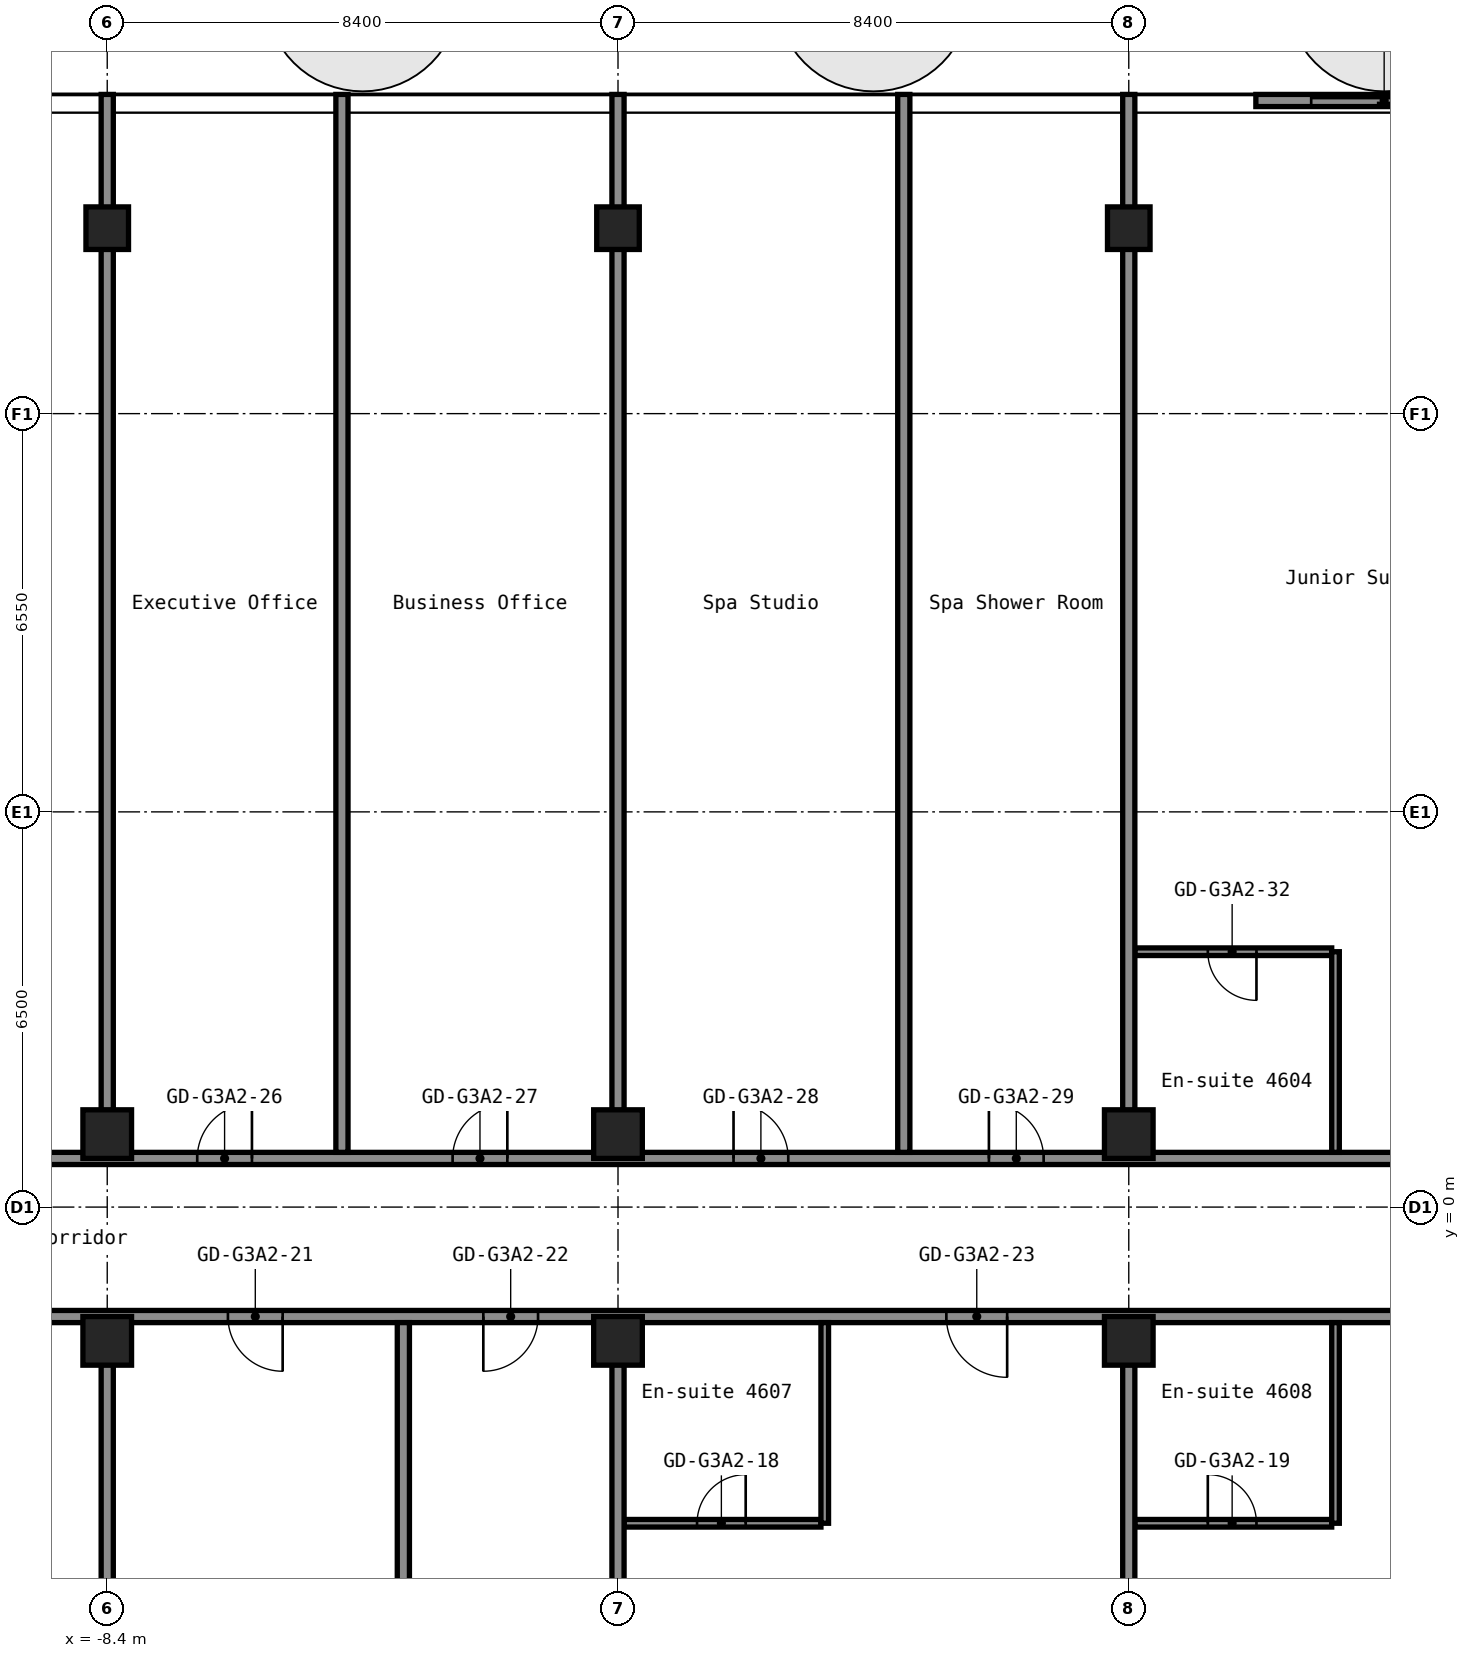
"""IFC4 building model, lengths in metres.
Left out: names, types, materials, properties, quantities, classifications, styles, units other than length and angle.
Written with IfcOpenShell. Run it as: python <this file> out.ifc"""

import sys

from ifc_helpers import new_model, si_unit, direction, frame, frame_2d, origin, origin_2d, place, context, subcontext, project, spatial, rectangle, hollow_rectangle, extrude, element, fill, save


model = new_model("IFC4")
c1 = context("Model", 3, precision=1e-05, world=origin(), true_north=direction((0.0, 1.0)))
c2 = subcontext(c1, "Body", "Model", "MODEL_VIEW")
j1 = project(units=[si_unit("LENGTHUNIT", "METRE"), si_unit("PLANEANGLEUNIT", "RADIAN")], contexts=[c1])
p1 = place(None, origin())
s1 = spatial("IfcSite", under=j1, at=p1, CompositionType="ELEMENT")
p2 = place(p1, origin())
s2 = spatial("IfcBuilding", under=s1, at=p2, CompositionType="ELEMENT")
p3 = place(p2, frame((0.0, 0.0, 163.0)))
s3 = spatial("IfcBuildingStorey", under=s2, at=p3, CompositionType="ELEMENT", Elevation=163.0)
for number, where, z_axis, x_axis in (
    (1, (-8.4, -2.2, 0.0), (0.0, 0.0, 1.0), (1.0, 0.0, 0.0)),
    (2, (-8.4, 1.2, 0.0), (0.0, 0.0, 1.0), (1.0, 0.0, 0.0)),
):
    element("IfcColumn", number, at=place(p3, frame(where, z_axis=z_axis, x_axis=x_axis)), inside=s3, PredefinedType="COLUMN", context=c2, shape_type="SweptSolid", body=[
        extrude(hollow_rectangle(XDim=0.8, YDim=0.8, WallThickness=0.032, at=origin_2d()), origin(), (0.0, 0.0, 1.0), 2.75),
    ])
p4 = place(p3, frame((-8.4, 16.1, 0.0), z_axis=(0.0, 0.0, 1.0), x_axis=(1.0, 0.0, 0.0)))
e3 = element("IfcColumn", 3, at=p4, inside=s3, PredefinedType="COLUMN", context=c2, shape_type="SweptSolid", body=[
    extrude(hollow_rectangle(XDim=0.7, YDim=0.7, WallThickness=0.028, at=origin_2d()), origin(), (0.0, 0.0, 1.0), 2.75),
])
for number, where, z_axis, x_axis in (
    (4, (0.0, -2.2, 0.0), (0.0, 0.0, 1.0), (1.0, 0.0, 0.0)),
    (5, (0.0, 1.2, 0.0), (0.0, 0.0, 1.0), (1.0, 0.0, 0.0)),
):
    element("IfcColumn", number, at=place(p3, frame(where, z_axis=z_axis, x_axis=x_axis)), inside=s3, PredefinedType="COLUMN", context=c2, shape_type="SweptSolid", body=[
        extrude(hollow_rectangle(XDim=0.8, YDim=0.8, WallThickness=0.032, at=origin_2d()), origin(), (0.0, 0.0, 1.0), 2.75),
    ])
p5 = place(p3, frame((0.0, 16.1, 0.0), z_axis=(0.0, 0.0, 1.0), x_axis=(1.0, 0.0, 0.0)))
e6 = element("IfcColumn", 6, at=p5, inside=s3, PredefinedType="COLUMN", context=c2, shape_type="SweptSolid", body=[
    extrude(hollow_rectangle(XDim=0.7, YDim=0.7, WallThickness=0.028, at=origin_2d()), origin(), (0.0, 0.0, 1.0), 2.75),
])
for number, where, z_axis, x_axis in (
    (7, (8.4, -2.2, 0.0), (0.0, 0.0, 1.0), (1.0, 0.0, 0.0)),
    (8, (8.4, 1.2, 0.0), (0.0, 0.0, 1.0), (1.0, 0.0, 0.0)),
):
    element("IfcColumn", number, at=place(p3, frame(where, z_axis=z_axis, x_axis=x_axis)), inside=s3, PredefinedType="COLUMN", context=c2, shape_type="SweptSolid", body=[
        extrude(hollow_rectangle(XDim=0.8, YDim=0.8, WallThickness=0.032, at=origin_2d()), origin(), (0.0, 0.0, 1.0), 2.75),
    ])
p6 = place(p3, frame((8.4, 16.1, 0.0), z_axis=(0.0, 0.0, 1.0), x_axis=(1.0, 0.0, 0.0)))
e9 = element("IfcColumn", 9, at=p6, inside=s3, PredefinedType="COLUMN", context=c2, shape_type="SweptSolid", body=[
    extrude(hollow_rectangle(XDim=0.7, YDim=0.7, WallThickness=0.028, at=origin_2d()), origin(), (0.0, 0.0, 1.0), 2.75),
])
p7 = place(p3, frame((0.1, -5.2, 0.0), z_axis=(0.0, 0.0, 1.0), x_axis=(1.0, 0.0, 0.0)))
e10 = element("IfcWall", 10, at=p7, inside=s3, PredefinedType="PARTITIONING", context=c2, shape_type="SweptSolid", body=[
    extrude(rectangle(XDim=3.237, YDim=0.125, at=frame_2d((1.619, 0.0))), origin(), (0.0, 0.0, 1.0), 2.75),
])
p8 = place(p7, frame((1.2, 0.0, 0.0)))
e11 = element("IfcOpeningElement", 11, at=p8, cuts=e10, PredefinedType="OPENING", context=c2, shape_type="SweptSolid", body=[
    extrude(rectangle(XDim=0.8, YDim=2.1, at=frame_2d((0.4, 1.05))), frame((0.0, 0.073, 0.0), z_axis=(0.0, -1.0, 0.0), x_axis=(1.0, 0.0, 0.0)), (0.0, 0.0, 1.0), 0.145),
])
p9 = place(p3, frame((8.5, -5.2, 0.0), z_axis=(0.0, 0.0, 1.0), x_axis=(1.0, 0.0, 0.0)))
e12 = element("IfcWall", 12, at=p9, inside=s3, PredefinedType="PARTITIONING", context=c2, shape_type="SweptSolid", body=[
    extrude(rectangle(XDim=3.238, YDim=0.125, at=frame_2d((1.619, 0.0))), origin(), (0.0, 0.0, 1.0), 2.75),
])
p10 = place(p9, frame((1.2, 0.0, 0.0)))
e13 = element("IfcOpeningElement", 13, at=p10, cuts=e12, PredefinedType="OPENING", context=c2, shape_type="SweptSolid", body=[
    extrude(rectangle(XDim=0.8, YDim=2.1, at=frame_2d((0.4, 1.05))), frame((0.0, 0.073, 0.0), z_axis=(0.0, -1.0, 0.0), x_axis=(1.0, 0.0, 0.0)), (0.0, 0.0, 1.0), 0.145),
])
p11 = place(p3, frame((-16.8, -1.8, 0.0), z_axis=(0.0, 0.0, 1.0), x_axis=(1.0, 0.0, 0.0)))
e14 = element("IfcWall", 14, at=p11, inside=s3, PredefinedType="PARTITIONING", context=c2, shape_type="SweptSolid", body=[
    extrude(rectangle(XDim=33.6, YDim=0.2, at=frame_2d((16.8, 0.0))), origin(), (0.0, 0.0, 1.0), 2.75),
])
p12 = place(p11, frame((5.4, 0.0, 0.0)))
e15 = element("IfcOpeningElement", 15, at=p12, cuts=e14, PredefinedType="OPENING", context=c2, shape_type="SweptSolid", body=[
    extrude(rectangle(XDim=1.0, YDim=2.1, at=frame_2d((0.5, 1.05))), frame((0.0, 0.11, 0.0), z_axis=(0.0, -1.0, 0.0), x_axis=(1.0, 0.0, 0.0)), (0.0, 0.0, 1.0), 0.22),
])
p13 = place(p11, frame((10.385, 0.0, 0.0)))
e16 = element("IfcOpeningElement", 16, at=p13, cuts=e14, PredefinedType="OPENING", context=c2, shape_type="SweptSolid", body=[
    extrude(rectangle(XDim=0.9, YDim=2.1, at=frame_2d((0.45, 1.05))), frame((0.0, 0.11, 0.0), z_axis=(0.0, -1.0, 0.0), x_axis=(1.0, 0.0, 0.0)), (0.0, 0.0, 1.0), 0.22),
])
p14 = place(p11, frame((14.585, 0.0, 0.0)))
e17 = element("IfcOpeningElement", 17, at=p14, cuts=e14, PredefinedType="OPENING", context=c2, shape_type="SweptSolid", body=[
    extrude(rectangle(XDim=0.9, YDim=2.1, at=frame_2d((0.45, 1.05))), frame((0.0, 0.11, 0.0), z_axis=(0.0, -1.0, 0.0), x_axis=(1.0, 0.0, 0.0)), (0.0, 0.0, 1.0), 0.22),
])
p15 = place(p11, frame((22.2, 0.0, 0.0)))
e18 = element("IfcOpeningElement", 18, at=p15, cuts=e14, PredefinedType="OPENING", context=c2, shape_type="SweptSolid", body=[
    extrude(rectangle(XDim=1.0, YDim=2.1, at=frame_2d((0.5, 1.05))), frame((0.0, 0.11, 0.0), z_axis=(0.0, -1.0, 0.0), x_axis=(1.0, 0.0, 0.0)), (0.0, 0.0, 1.0), 0.22),
])
p16 = place(p11, frame((30.6, 0.0, 0.0)))
e19 = element("IfcOpeningElement", 19, at=p16, cuts=e14, PredefinedType="OPENING", context=c2, shape_type="SweptSolid", body=[
    extrude(rectangle(XDim=1.0, YDim=2.1, at=frame_2d((0.5, 1.05))), frame((0.0, 0.11, 0.0), z_axis=(0.0, -1.0, 0.0), x_axis=(1.0, 0.0, 0.0)), (0.0, 0.0, 1.0), 0.22),
])
p17 = place(p3, frame((-16.8, 0.8, 0.0), z_axis=(0.0, 0.0, 1.0), x_axis=(1.0, 0.0, 0.0)))
e20 = element("IfcWall", 20, at=p17, inside=s3, PredefinedType="PARTITIONING", context=c2, shape_type="SweptSolid", body=[
    extrude(rectangle(XDim=33.6, YDim=0.2, at=frame_2d((16.8, 0.0))), origin(), (0.0, 0.0, 1.0), 2.75),
])
p18 = place(p17, frame((5.4, 0.0, 0.0)))
e21 = element("IfcOpeningElement", 21, at=p18, cuts=e20, PredefinedType="OPENING", context=c2, shape_type="SweptSolid", body=[
    extrude(rectangle(XDim=1.0, YDim=2.1, at=frame_2d((0.5, 1.05))), frame((0.0, 0.11, 0.0), z_axis=(0.0, -1.0, 0.0), x_axis=(1.0, 0.0, 0.0)), (0.0, 0.0, 1.0), 0.22),
])
p19 = place(p17, frame((9.88, 0.0, 0.0)))
e22 = element("IfcOpeningElement", 22, at=p19, cuts=e20, PredefinedType="OPENING", context=c2, shape_type="SweptSolid", body=[
    extrude(rectangle(XDim=0.9, YDim=2.1, at=frame_2d((0.45, 1.05))), frame((0.0, 0.11, 0.0), z_axis=(0.0, -1.0, 0.0), x_axis=(1.0, 0.0, 0.0)), (0.0, 0.0, 1.0), 0.22),
])
p20 = place(p17, frame((14.08, 0.0, 0.0)))
e23 = element("IfcOpeningElement", 23, at=p20, cuts=e20, PredefinedType="OPENING", context=c2, shape_type="SweptSolid", body=[
    extrude(rectangle(XDim=0.9, YDim=2.1, at=frame_2d((0.45, 1.05))), frame((0.0, 0.11, 0.0), z_axis=(0.0, -1.0, 0.0), x_axis=(1.0, 0.0, 0.0)), (0.0, 0.0, 1.0), 0.22),
])
p21 = place(p17, frame((18.7, 0.0, 0.0)))
e24 = element("IfcOpeningElement", 24, at=p21, cuts=e20, PredefinedType="OPENING", context=c2, shape_type="SweptSolid", body=[
    extrude(rectangle(XDim=0.9, YDim=2.1, at=frame_2d((0.45, 1.05))), frame((0.0, 0.11, 0.0), z_axis=(0.0, -1.0, 0.0), x_axis=(1.0, 0.0, 0.0)), (0.0, 0.0, 1.0), 0.22),
])
p22 = place(p17, frame((22.9, 0.0, 0.0)))
e25 = element("IfcOpeningElement", 25, at=p22, cuts=e20, PredefinedType="OPENING", context=c2, shape_type="SweptSolid", body=[
    extrude(rectangle(XDim=0.9, YDim=2.1, at=frame_2d((0.45, 1.05))), frame((0.0, 0.11, 0.0), z_axis=(0.0, -1.0, 0.0), x_axis=(1.0, 0.0, 0.0)), (0.0, 0.0, 1.0), 0.22),
])
p23 = place(p17, frame((30.6, 0.0, 0.0)))
e26 = element("IfcOpeningElement", 26, at=p23, cuts=e20, PredefinedType="OPENING", context=c2, shape_type="SweptSolid", body=[
    extrude(rectangle(XDim=1.0, YDim=2.1, at=frame_2d((0.5, 1.05))), frame((0.0, 0.11, 0.0), z_axis=(0.0, -1.0, 0.0), x_axis=(1.0, 0.0, 0.0)), (0.0, 0.0, 1.0), 0.22),
])
p24 = place(p3, frame((8.5, 4.2, 0.0), z_axis=(0.0, 0.0, 1.0), x_axis=(1.0, 0.0, 0.0)))
e27 = element("IfcWall", 27, at=p24, inside=s3, PredefinedType="PARTITIONING", context=c2, shape_type="SweptSolid", body=[
    extrude(rectangle(XDim=3.238, YDim=0.125, at=frame_2d((1.619, 0.0))), origin(), (0.0, 0.0, 1.0), 2.75),
])
p25 = place(p24, frame((1.2, 0.0, 0.0)))
e28 = element("IfcOpeningElement", 28, at=p25, cuts=e27, PredefinedType="OPENING", context=c2, shape_type="SweptSolid", body=[
    extrude(rectangle(XDim=0.8, YDim=2.1, at=frame_2d((0.4, 1.05))), frame((0.0, 0.073, 0.0), z_axis=(0.0, -1.0, 0.0), x_axis=(1.0, 0.0, 0.0)), (0.0, 0.0, 1.0), 0.145),
])
for number, where, z_axis, x_axis in (
    (29, (-8.4, -19.3, 0.0), (0.0, 0.0, 1.0), (0.0, 1.0, 0.0)),
    (30, (-8.4, 1.59, 0.0), (0.0, 0.0, 1.0), (0.0, 1.0, 0.0)),
):
    element("IfcWall", number, at=place(p3, frame(where, z_axis=z_axis, x_axis=x_axis)), inside=s3, PredefinedType="PARTITIONING", context=c2, shape_type="SweptSolid", body=[
        extrude(rectangle(XDim=16.71, YDim=0.2, at=frame_2d((8.355, 0.0))), origin(), (0.0, 0.0, 1.0), 2.75),
    ])
for number, where, z_axis, x_axis in (
    (31, (-4.54, 0.9, 0.0), (0.0, 0.0, 1.0), (0.0, 1.0, 0.0)),
    (32, (-3.53, -19.3, 0.0), (0.0, 0.0, 1.0), (0.0, 1.0, 0.0)),
):
    element("IfcWall", number, at=place(p3, frame(where, z_axis=z_axis, x_axis=x_axis)), inside=s3, PredefinedType="PARTITIONING", context=c2, shape_type="SweptSolid", body=[
        extrude(rectangle(XDim=17.4, YDim=0.2, at=frame_2d((8.7, 0.0))), origin(), (0.0, 0.0, 1.0), 2.75),
    ])
for number, where, z_axis, x_axis in (
    (33, (0.0, -19.3, 0.0), (0.0, 0.0, 1.0), (0.0, 1.0, 0.0)),
    (34, (0.0, 1.59, 0.0), (0.0, 0.0, 1.0), (0.0, 1.0, 0.0)),
):
    element("IfcWall", number, at=place(p3, frame(where, z_axis=z_axis, x_axis=x_axis)), inside=s3, PredefinedType="PARTITIONING", context=c2, shape_type="SweptSolid", body=[
        extrude(rectangle(XDim=16.71, YDim=0.2, at=frame_2d((8.355, 0.0))), origin(), (0.0, 0.0, 1.0), 2.75),
    ])
p26 = place(p3, frame((3.4, -5.2, 0.0), z_axis=(0.0, 0.0, 1.0), x_axis=(0.0, 1.0, 0.0)))
e35 = element("IfcWall", 35, at=p26, inside=s3, PredefinedType="PARTITIONING", context=c2, shape_type="SweptSolid", body=[
    extrude(rectangle(XDim=3.3, YDim=0.125, at=frame_2d((1.65, 0.0))), origin(), (0.0, 0.0, 1.0), 2.75),
])
p27 = place(p3, frame((4.7, 0.9, 0.0), z_axis=(0.0, 0.0, 1.0), x_axis=(0.0, 1.0, 0.0)))
e36 = element("IfcWall", 36, at=p27, inside=s3, PredefinedType="PARTITIONING", context=c2, shape_type="SweptSolid", body=[
    extrude(rectangle(XDim=17.4, YDim=0.2, at=frame_2d((8.7, 0.0))), origin(), (0.0, 0.0, 1.0), 2.75),
])
for number, where, z_axis, x_axis in (
    (37, (8.4, -19.3, 0.0), (0.0, 0.0, 1.0), (0.0, 1.0, 0.0)),
    (38, (8.4, 1.59, 0.0), (0.0, 0.0, 1.0), (0.0, 1.0, 0.0)),
):
    element("IfcWall", number, at=place(p3, frame(where, z_axis=z_axis, x_axis=x_axis)), inside=s3, PredefinedType="PARTITIONING", context=c2, shape_type="SweptSolid", body=[
        extrude(rectangle(XDim=16.71, YDim=0.2, at=frame_2d((8.355, 0.0))), origin(), (0.0, 0.0, 1.0), 2.75),
    ])
for number, where, z_axis, x_axis in (
    (39, (11.8, -5.2, 0.0), (0.0, 0.0, 1.0), (0.0, 1.0, 0.0)),
    (40, (11.8, 0.9, 0.0), (0.0, 0.0, 1.0), (0.0, 1.0, 0.0)),
):
    element("IfcWall", number, at=place(p3, frame(where, z_axis=z_axis, x_axis=x_axis)), inside=s3, PredefinedType="PARTITIONING", context=c2, shape_type="SweptSolid", body=[
        extrude(rectangle(XDim=3.3, YDim=0.125, at=frame_2d((1.65, 0.0))), origin(), (0.0, 0.0, 1.0), 2.75),
    ])
p28 = place(p3, frame((14.71, 18.2, 0.0), z_axis=(0.0, 0.0, 1.0), x_axis=(-1.0, 0.0, 0.0)))
p29 = place(p28, frame((0.91, 0.0, 0.0)))
p30 = place(p29, frame((2.4, 0.0, 0.0), z_axis=(0.0, 0.0, 1.0), x_axis=(-1.0, 0.0, 0.0)))
e41 = element("IfcDoor", 41, at=p30, inside=s3, OperationType="SLIDING_TO_LEFT", PredefinedType="DOOR", context=c2, shape_type="SweptSolid", body=[
    extrude(rectangle(XDim=2.4, YDim=2.2, at=frame_2d((1.2, 1.1))), frame((0.0, 0.025, 0.0), z_axis=(0.0, -1.0, 0.0), x_axis=(1.0, 0.0, 0.0)), (0.0, 0.0, 1.0), 0.05),
])
p31 = place(p8, origin())
e42 = element("IfcDoor", 42, at=p31, inside=s3, OperationType="SINGLE_SWING_LEFT", PredefinedType="DOOR", context=c2, shape_type="SweptSolid", body=[
    extrude(rectangle(XDim=0.8, YDim=2.1, at=frame_2d((0.4, 1.05))), frame((0.0, 0.025, 0.0), z_axis=(0.0, -1.0, 0.0), x_axis=(1.0, 0.0, 0.0)), (0.0, 0.0, 1.0), 0.05),
])
fill(e11, e42)
p32 = place(p10, origin())
e43 = element("IfcDoor", 43, at=p32, inside=s3, OperationType="SINGLE_SWING_RIGHT", PredefinedType="DOOR", context=c2, shape_type="SweptSolid", body=[
    extrude(rectangle(XDim=0.8, YDim=2.1, at=frame_2d((0.4, 1.05))), frame((0.0, 0.025, 0.0), z_axis=(0.0, -1.0, 0.0), x_axis=(1.0, 0.0, 0.0)), (0.0, 0.0, 1.0), 0.05),
])
fill(e13, e43)
p33 = place(p13, origin())
e44 = element("IfcDoor", 44, at=p33, inside=s3, OperationType="SINGLE_SWING_RIGHT", PredefinedType="DOOR", context=c2, shape_type="SweptSolid", body=[
    extrude(rectangle(XDim=0.9, YDim=2.1, at=frame_2d((0.45, 1.05))), frame((0.0, 0.025, 0.0), z_axis=(0.0, -1.0, 0.0), x_axis=(1.0, 0.0, 0.0)), (0.0, 0.0, 1.0), 0.05),
])
fill(e16, e44)
p34 = place(p14, origin())
e45 = element("IfcDoor", 45, at=p34, inside=s3, OperationType="SINGLE_SWING_LEFT", PredefinedType="DOOR", context=c2, shape_type="SweptSolid", body=[
    extrude(rectangle(XDim=0.9, YDim=2.1, at=frame_2d((0.45, 1.05))), frame((0.0, 0.025, 0.0), z_axis=(0.0, -1.0, 0.0), x_axis=(1.0, 0.0, 0.0)), (0.0, 0.0, 1.0), 0.05),
])
fill(e17, e45)
p35 = place(p15, origin())
e46 = element("IfcDoor", 46, at=p35, inside=s3, OperationType="SINGLE_SWING_RIGHT", PredefinedType="DOOR", context=c2, shape_type="SweptSolid", body=[
    extrude(rectangle(XDim=1.0, YDim=2.1, at=frame_2d((0.5, 1.05))), frame((0.0, 0.025, 0.0), z_axis=(0.0, -1.0, 0.0), x_axis=(1.0, 0.0, 0.0)), (0.0, 0.0, 1.0), 0.05),
])
fill(e18, e46)
p36 = place(p19, origin())
e47 = element("IfcDoor", 47, at=p36, inside=s3, OperationType="SINGLE_SWING_LEFT", PredefinedType="DOOR", context=c2, shape_type="SweptSolid", body=[
    extrude(rectangle(XDim=0.9, YDim=2.1, at=frame_2d((0.45, 1.05))), frame((0.0, 0.025, 0.0), z_axis=(0.0, -1.0, 0.0), x_axis=(1.0, 0.0, 0.0)), (0.0, 0.0, 1.0), 0.05),
])
fill(e22, e47)
p37 = place(p20, origin())
e48 = element("IfcDoor", 48, at=p37, inside=s3, OperationType="SINGLE_SWING_LEFT", PredefinedType="DOOR", context=c2, shape_type="SweptSolid", body=[
    extrude(rectangle(XDim=0.9, YDim=2.1, at=frame_2d((0.45, 1.05))), frame((0.0, 0.025, 0.0), z_axis=(0.0, -1.0, 0.0), x_axis=(1.0, 0.0, 0.0)), (0.0, 0.0, 1.0), 0.05),
])
fill(e23, e48)
p38 = place(p21, origin())
e49 = element("IfcDoor", 49, at=p38, inside=s3, OperationType="SINGLE_SWING_RIGHT", PredefinedType="DOOR", context=c2, shape_type="SweptSolid", body=[
    extrude(rectangle(XDim=0.9, YDim=2.1, at=frame_2d((0.45, 1.05))), frame((0.0, 0.025, 0.0), z_axis=(0.0, -1.0, 0.0), x_axis=(1.0, 0.0, 0.0)), (0.0, 0.0, 1.0), 0.05),
])
fill(e24, e49)
p39 = place(p22, origin())
e50 = element("IfcDoor", 50, at=p39, inside=s3, OperationType="SINGLE_SWING_RIGHT", PredefinedType="DOOR", context=c2, shape_type="SweptSolid", body=[
    extrude(rectangle(XDim=0.9, YDim=2.1, at=frame_2d((0.45, 1.05))), frame((0.0, 0.025, 0.0), z_axis=(0.0, -1.0, 0.0), x_axis=(1.0, 0.0, 0.0)), (0.0, 0.0, 1.0), 0.05),
])
fill(e25, e50)
p40 = place(p25, origin())
e51 = element("IfcDoor", 51, at=p40, inside=s3, OperationType="SINGLE_SWING_RIGHT", PredefinedType="DOOR", context=c2, shape_type="SweptSolid", body=[
    extrude(rectangle(XDim=0.8, YDim=2.1, at=frame_2d((0.4, 1.05))), frame((0.0, 0.025, 0.0), z_axis=(0.0, -1.0, 0.0), x_axis=(1.0, 0.0, 0.0)), (0.0, 0.0, 1.0), 0.05),
])
fill(e28, e51)
save(model, sys.argv[1])
